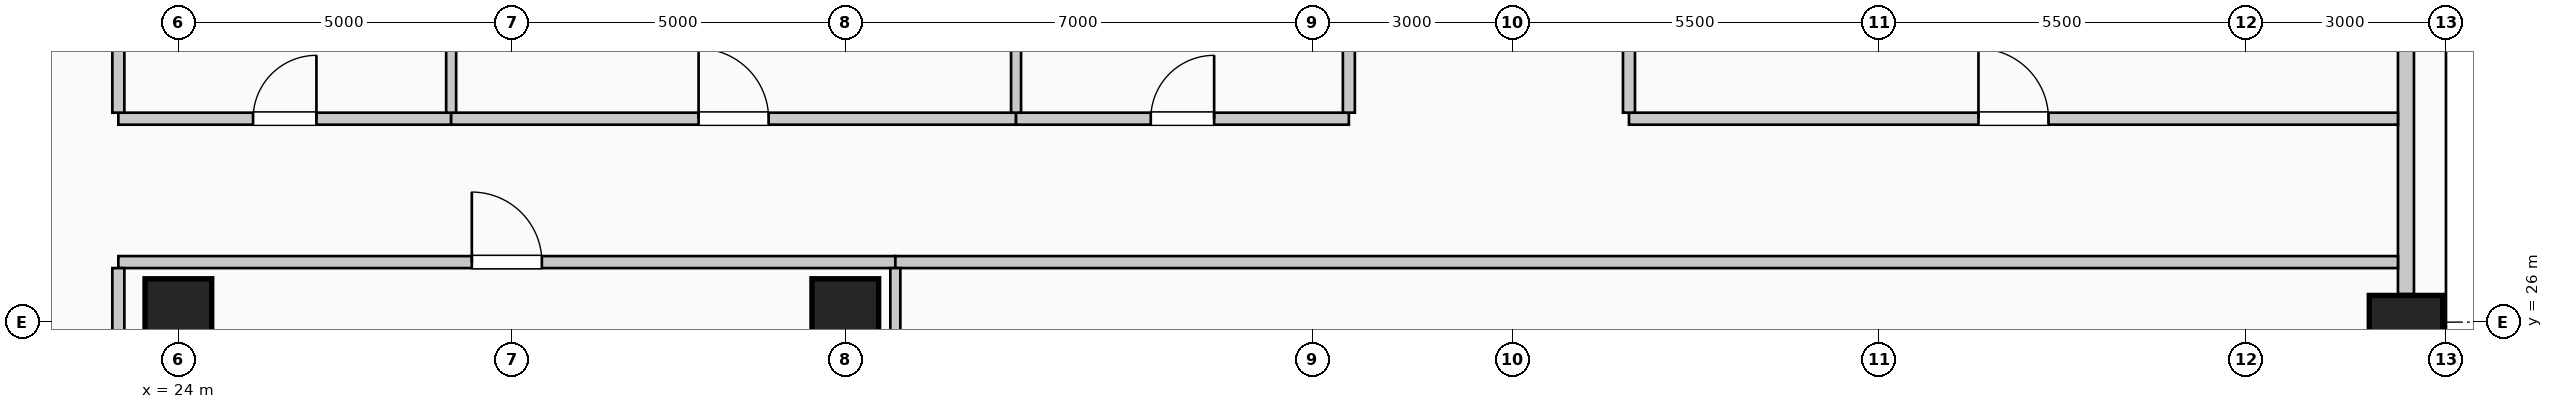
"""IFC4 building model, lengths in metres.
Left out: names, types, materials, properties, quantities, classifications, styles, units other than length and angle.
Written with IfcOpenShell. Run it as: python <this file> out.ifc"""

import sys

from ifc_helpers import new_model, si_unit, direction, frame, frame_2d, origin, origin_2d, place, context, subcontext, project, spatial, rectangle, extrude, element, fill, save


model = new_model("IFC4")
c1 = context("Model", 3, precision=1e-05, world=origin(), true_north=direction((0.0, 1.0)))
c2 = subcontext(c1, "Body", "Model", "MODEL_VIEW")
j1 = project(units=[si_unit("LENGTHUNIT", "METRE"), si_unit("PLANEANGLEUNIT", "RADIAN")], contexts=[c1])
p1 = place(None, origin())
s1 = spatial("IfcSite", under=j1, at=p1, CompositionType="ELEMENT")
p2 = place(p1, origin())
s2 = spatial("IfcBuilding", under=s1, at=p2, CompositionType="ELEMENT")
p3 = place(p2, frame((0.0, 0.0, 218.6)))
s3 = spatial("IfcBuildingStorey", under=s2, at=p3, CompositionType="ELEMENT", Elevation=218.6)
p4 = place(p3, frame((57.4, 26.0, 0.0), z_axis=(0.0, 0.0, 1.0), x_axis=(0.0, 1.0, 0.0)))
e1 = element("IfcColumn", 1, at=p4, inside=s3, PredefinedType="COLUMN", context=c2, shape_type="SweptSolid", body=[
    extrude(rectangle(XDim=0.8, YDim=1.1, at=origin_2d()), origin(), (0.0, 0.0, 1.0), 4.0),
])
for number, where, z_axis, x_axis in (
    (2, (24.0, 26.0, 0.0), (0.0, 0.0, 1.0), (1.0, 0.0, 0.0)),
    (3, (34.0, 26.0, 0.0), (0.0, 0.0, 1.0), (1.0, 0.0, 0.0)),
):
    element("IfcColumn", number, at=place(p3, frame(where, z_axis=z_axis, x_axis=x_axis)), inside=s3, PredefinedType="COLUMN", context=c2, shape_type="SweptSolid", body=[
        extrude(rectangle(XDim=1.0, YDim=1.3, at=origin_2d()), origin(), (0.0, 0.0, 1.0), 4.0),
    ])
p5 = place(p3, frame((57.4, 33.58, 0.0), z_axis=(0.0, 0.0, 1.0), x_axis=(0.0, -1.0, 0.0)))
e4 = element("IfcWall", 4, at=p5, inside=s3, PredefinedType="SOLIDWALL", context=c2, shape_type="SweptSolid", body=[
    extrude(rectangle(XDim=7.16, YDim=0.24, at=frame_2d((3.58, 0.0))), origin(), (0.0, 0.0, 1.0), 3.0),
])
p6 = place(p3, frame((23.1, 26.9, 0.0), z_axis=(0.0, 0.0, 1.0), x_axis=(1.0, 0.0, 0.0)))
e5 = element("IfcWall", 5, at=p6, inside=s3, PredefinedType="PARTITIONING", context=c2, shape_type="SweptSolid", body=[
    extrude(rectangle(XDim=11.65, YDim=0.18, at=frame_2d((5.825, 0.0))), origin(), (0.0, 0.0, 1.0), 3.75),
])
p7 = place(p6, frame((5.3, 0.0, 0.0)))
e6 = element("IfcOpeningElement", 6, at=p7, cuts=e5, PredefinedType="OPENING", context=c2, shape_type="SweptSolid", body=[
    extrude(rectangle(XDim=1.05, YDim=2.15, at=frame_2d((0.525, 1.075))), frame((0.0, 0.1, 0.0), z_axis=(0.0, -1.0, 0.0), x_axis=(1.0, 0.0, 0.0)), (0.0, 0.0, 1.0), 0.2),
])
p8 = place(p3, frame((34.75, 26.9, 0.0), z_axis=(0.0, 0.0, 1.0), x_axis=(1.0, 0.0, 0.0)))
e7 = element("IfcWall", 7, at=p8, inside=s3, PredefinedType="PARTITIONING", context=c2, shape_type="SweptSolid", body=[
    extrude(rectangle(XDim=22.53, YDim=0.18, at=frame_2d((11.265, 0.0))), origin(), (0.0, 0.0, 1.0), 3.75),
])
p9 = place(p3, frame((23.1, 29.05, 0.0), z_axis=(0.0, 0.0, 1.0), x_axis=(1.0, 0.0, 0.0)))
e8 = element("IfcWall", 8, at=p9, inside=s3, PredefinedType="PARTITIONING", context=c2, shape_type="SweptSolid", body=[
    extrude(rectangle(XDim=4.99, YDim=0.18, at=frame_2d((2.495, 0.0))), origin(), (0.0, 0.0, 1.0), 3.75),
])
p10 = place(p9, frame((2.02, 0.0, 0.0)))
e9 = element("IfcOpeningElement", 9, at=p10, cuts=e8, PredefinedType="OPENING", context=c2, shape_type="SweptSolid", body=[
    extrude(rectangle(XDim=0.95, YDim=2.15, at=frame_2d((0.475, 1.075))), frame((0.0, 0.1, 0.0), z_axis=(0.0, -1.0, 0.0), x_axis=(1.0, 0.0, 0.0)), (0.0, 0.0, 1.0), 0.2),
])
p11 = place(p3, frame((28.09, 29.05, 0.0), z_axis=(0.0, 0.0, 1.0), x_axis=(1.0, 0.0, 0.0)))
e10 = element("IfcWall", 10, at=p11, inside=s3, PredefinedType="PARTITIONING", context=c2, shape_type="SweptSolid", body=[
    extrude(rectangle(XDim=8.47, YDim=0.18, at=frame_2d((4.235, 0.0))), origin(), (0.0, 0.0, 1.0), 3.75),
])
p12 = place(p11, frame((3.71, 0.0, 0.0)))
e11 = element("IfcOpeningElement", 11, at=p12, cuts=e10, PredefinedType="OPENING", context=c2, shape_type="SweptSolid", body=[
    extrude(rectangle(XDim=1.05, YDim=2.15, at=frame_2d((0.525, 1.075))), frame((0.0, 0.1, 0.0), z_axis=(0.0, -1.0, 0.0), x_axis=(1.0, 0.0, 0.0)), (0.0, 0.0, 1.0), 0.2),
])
p13 = place(p3, frame((36.56, 29.05, 0.0), z_axis=(0.0, 0.0, 1.0), x_axis=(1.0, 0.0, 0.0)))
e12 = element("IfcWall", 12, at=p13, inside=s3, PredefinedType="PARTITIONING", context=c2, shape_type="SweptSolid", body=[
    extrude(rectangle(XDim=4.99, YDim=0.18, at=frame_2d((2.495, 0.0))), origin(), (0.0, 0.0, 1.0), 3.75),
])
p14 = place(p13, frame((2.02, 0.0, 0.0)))
e13 = element("IfcOpeningElement", 13, at=p14, cuts=e12, PredefinedType="OPENING", context=c2, shape_type="SweptSolid", body=[
    extrude(rectangle(XDim=0.95, YDim=2.15, at=frame_2d((0.475, 1.075))), frame((0.0, 0.1, 0.0), z_axis=(0.0, -1.0, 0.0), x_axis=(1.0, 0.0, 0.0)), (0.0, 0.0, 1.0), 0.2),
])
p15 = place(p3, frame((45.75, 29.05, 0.0), z_axis=(0.0, 0.0, 1.0), x_axis=(1.0, 0.0, 0.0)))
e14 = element("IfcWall", 14, at=p15, inside=s3, PredefinedType="PARTITIONING", context=c2, shape_type="SweptSolid", body=[
    extrude(rectangle(XDim=11.53, YDim=0.18, at=frame_2d((5.765, 0.0))), origin(), (0.0, 0.0, 1.0), 3.75),
])
p16 = place(p15, frame((5.24, 0.0, 0.0)))
e15 = element("IfcOpeningElement", 15, at=p16, cuts=e14, PredefinedType="OPENING", context=c2, shape_type="SweptSolid", body=[
    extrude(rectangle(XDim=1.05, YDim=2.15, at=frame_2d((0.525, 1.075))), frame((0.0, 0.1, 0.0), z_axis=(0.0, -1.0, 0.0), x_axis=(1.0, 0.0, 0.0)), (0.0, 0.0, 1.0), 0.2),
])
p17 = place(p3, frame((23.1, 19.725, 0.0), z_axis=(0.0, 0.0, 1.0), x_axis=(0.0, 1.0, 0.0)))
e16 = element("IfcWall", 16, at=p17, inside=s3, PredefinedType="PARTITIONING", context=c2, shape_type="SweptSolid", body=[
    extrude(rectangle(XDim=7.085, YDim=0.18, at=frame_2d((3.542, 0.0))), origin(), (0.0, 0.0, 1.0), 3.75),
])
p18 = place(p3, frame((23.1, 29.14, 0.0), z_axis=(0.0, 0.0, 1.0), x_axis=(0.0, 1.0, 0.0)))
e17 = element("IfcWall", 17, at=p18, inside=s3, PredefinedType="PARTITIONING", context=c2, shape_type="SweptSolid", body=[
    extrude(rectangle(XDim=3.12, YDim=0.18, at=frame_2d((1.56, 0.0))), origin(), (0.0, 0.0, 1.0), 3.75),
])
p19 = place(p3, frame((28.09, 29.14, 0.0), z_axis=(0.0, 0.0, 1.0), x_axis=(0.0, 1.0, 0.0)))
e18 = element("IfcWall", 18, at=p19, inside=s3, PredefinedType="PARTITIONING", context=c2, shape_type="SweptSolid", body=[
    extrude(rectangle(XDim=16.14, YDim=0.15, at=frame_2d((8.07, 0.0))), origin(), (0.0, 0.0, 1.0), 3.75),
])
p20 = place(p3, frame((34.75, 19.725, 0.0), z_axis=(0.0, 0.0, 1.0), x_axis=(0.0, 1.0, 0.0)))
e19 = element("IfcWall", 19, at=p20, inside=s3, PredefinedType="PARTITIONING", context=c2, shape_type="SweptSolid", body=[
    extrude(rectangle(XDim=7.085, YDim=0.15, at=frame_2d((3.542, 0.0))), origin(), (0.0, 0.0, 1.0), 3.75),
])
p21 = place(p3, frame((36.56, 29.14, 0.0), z_axis=(0.0, 0.0, 1.0), x_axis=(0.0, 1.0, 0.0)))
e20 = element("IfcWall", 20, at=p21, inside=s3, PredefinedType="PARTITIONING", context=c2, shape_type="SweptSolid", body=[
    extrude(rectangle(XDim=16.14, YDim=0.15, at=frame_2d((8.07, 0.0))), origin(), (0.0, 0.0, 1.0), 3.75),
])
p22 = place(p3, frame((41.55, 29.14, 0.0), z_axis=(0.0, 0.0, 1.0), x_axis=(0.0, 1.0, 0.0)))
e21 = element("IfcWall", 21, at=p22, inside=s3, PredefinedType="PARTITIONING", context=c2, shape_type="SweptSolid", body=[
    extrude(rectangle(XDim=3.21, YDim=0.18, at=frame_2d((1.605, 0.0))), origin(), (0.0, 0.0, 1.0), 3.145),
])
p23 = place(p3, frame((45.75, 29.14, 0.0), z_axis=(0.0, 0.0, 1.0), x_axis=(0.0, 1.0, 0.0)))
e22 = element("IfcWall", 22, at=p23, inside=s3, PredefinedType="PARTITIONING", context=c2, shape_type="SweptSolid", body=[
    extrude(rectangle(XDim=3.135, YDim=0.18, at=frame_2d((1.567, 0.0))), origin(), (0.0, 0.0, 1.0), 3.75),
])
p24 = place(p7, origin())
e23 = element("IfcDoor", 23, at=p24, inside=s3, OperationType="SINGLE_SWING_LEFT", PredefinedType="DOOR", context=c2, shape_type="SweptSolid", body=[
    extrude(rectangle(XDim=1.05, YDim=2.15, at=frame_2d((0.525, 1.075))), frame((0.0, 0.025, 0.0), z_axis=(0.0, -1.0, 0.0), x_axis=(1.0, 0.0, 0.0)), (0.0, 0.0, 1.0), 0.05),
])
fill(e6, e23)
p25 = place(p10, origin())
e24 = element("IfcDoor", 24, at=p25, inside=s3, OperationType="SINGLE_SWING_RIGHT", PredefinedType="DOOR", context=c2, shape_type="SweptSolid", body=[
    extrude(rectangle(XDim=0.95, YDim=2.15, at=frame_2d((0.475, 1.075))), frame((0.0, 0.025, 0.0), z_axis=(0.0, -1.0, 0.0), x_axis=(1.0, 0.0, 0.0)), (0.0, 0.0, 1.0), 0.05),
])
fill(e9, e24)
p26 = place(p12, origin())
e25 = element("IfcDoor", 25, at=p26, inside=s3, OperationType="SINGLE_SWING_LEFT", PredefinedType="DOOR", context=c2, shape_type="SweptSolid", body=[
    extrude(rectangle(XDim=1.05, YDim=2.15, at=frame_2d((0.525, 1.075))), frame((0.0, 0.025, 0.0), z_axis=(0.0, -1.0, 0.0), x_axis=(1.0, 0.0, 0.0)), (0.0, 0.0, 1.0), 0.05),
])
fill(e11, e25)
p27 = place(p14, origin())
e26 = element("IfcDoor", 26, at=p27, inside=s3, OperationType="SINGLE_SWING_RIGHT", PredefinedType="DOOR", context=c2, shape_type="SweptSolid", body=[
    extrude(rectangle(XDim=0.95, YDim=2.15, at=frame_2d((0.475, 1.075))), frame((0.0, 0.025, 0.0), z_axis=(0.0, -1.0, 0.0), x_axis=(1.0, 0.0, 0.0)), (0.0, 0.0, 1.0), 0.05),
])
fill(e13, e26)
p28 = place(p16, origin())
e27 = element("IfcDoor", 27, at=p28, inside=s3, OperationType="SINGLE_SWING_LEFT", PredefinedType="DOOR", context=c2, shape_type="SweptSolid", body=[
    extrude(rectangle(XDim=1.05, YDim=2.15, at=frame_2d((0.525, 1.075))), frame((0.0, 0.025, 0.0), z_axis=(0.0, -1.0, 0.0), x_axis=(1.0, 0.0, 0.0)), (0.0, 0.0, 1.0), 0.05),
])
fill(e15, e27)
save(model, sys.argv[1])
